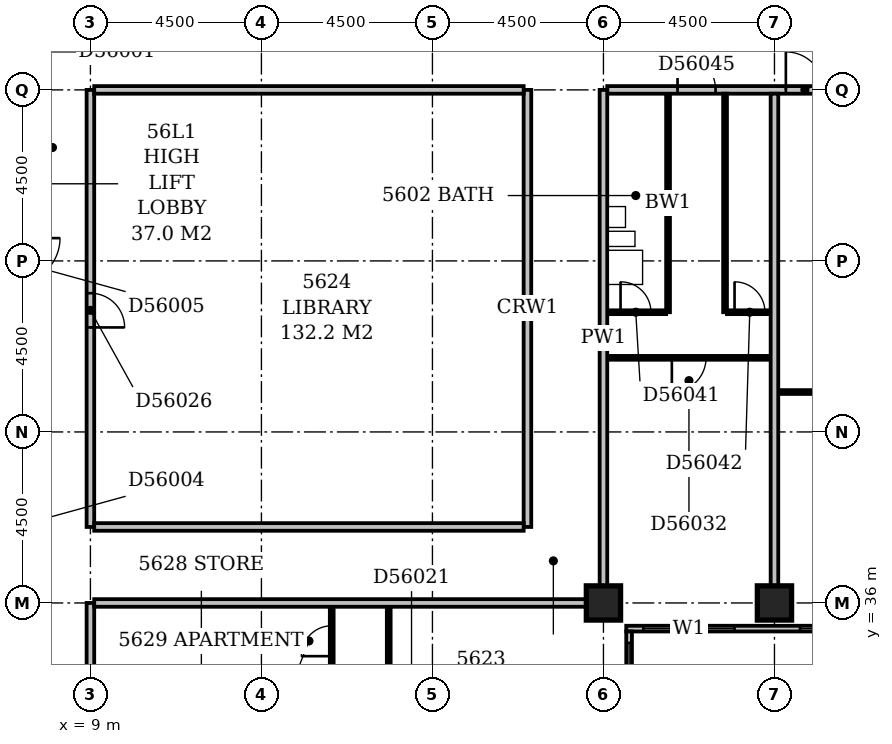
"""IFC4 building model, lengths in metres.
Left out: names, types, materials, properties, quantities, classifications, styles, units other than length and angle.
Written with IfcOpenShell. Run it as: python <this file> out.ifc"""

import sys

from ifc_helpers import new_model, si_unit, direction, frame, frame_2d, origin, origin_2d, place, context, subcontext, project, spatial, rectangle, extrude, element, fill, save


model = new_model("IFC4")
c1 = context("Model", 3, precision=1e-05, world=origin(), true_north=direction((0.0, 1.0)))
c2 = subcontext(c1, "Body", "Model", "MODEL_VIEW")
j1 = project(units=[si_unit("LENGTHUNIT", "METRE"), si_unit("PLANEANGLEUNIT", "RADIAN")], contexts=[c1])
p1 = place(None, origin())
s1 = spatial("IfcSite", under=j1, at=p1, CompositionType="ELEMENT")
p2 = place(p1, origin())
s2 = spatial("IfcBuilding", under=s1, at=p2, CompositionType="ELEMENT")
p3 = place(p2, frame((0.0, 0.0, 218.6)))
s3 = spatial("IfcBuildingStorey", under=s2, at=p3, CompositionType="ELEMENT", Elevation=218.6)
for number, where, z_axis, x_axis in (
    (1, (22.5, 36.0, -0.3), (0.0, 0.0, 1.0), (1.0, 0.0, 0.0)),
    (2, (27.0, 36.0, -0.3), (0.0, 0.0, 1.0), (1.0, 0.0, 0.0)),
):
    element("IfcColumn", number, at=place(p3, frame(where, z_axis=z_axis, x_axis=x_axis)), inside=s3, PredefinedType="COLUMN", context=c2, shape_type="SweptSolid", body=[
        extrude(rectangle(XDim=0.9, YDim=0.9, at=origin_2d()), origin(), (0.0, 0.0, 1.0), 3.6),
    ])
p4 = place(p3, frame((23.175, 17.4, 0.0), z_axis=(0.0, 0.0, 1.0), x_axis=(0.0, 1.0, 0.0)))
e3 = element("IfcWall", 3, at=p4, inside=s3, PredefinedType="STANDARD", context=c2, shape_type="SweptSolid", body=[
    extrude(rectangle(XDim=17.85, YDim=0.15, at=frame_2d((8.925, 0.0))), origin(), (0.0, 0.0, 1.0), 2.7),
])
p5 = place(p4, frame((1.65, 0.0, 0.6)))
e4 = element("IfcOpeningElement", 4, at=p5, cuts=e3, PredefinedType="OPENING", context=c2, shape_type="SweptSolid", body=[
    extrude(rectangle(XDim=2.4, YDim=1.8, at=frame_2d((1.2, 0.9))), frame((0.0, 0.087, 0.0), z_axis=(0.0, -1.0, 0.0), x_axis=(1.0, 0.0, 0.0)), (0.0, 0.0, 1.0), 0.174),
])
p6 = place(p4, frame((6.15, 0.0, 0.6)))
e5 = element("IfcOpeningElement", 5, at=p6, cuts=e3, PredefinedType="OPENING", context=c2, shape_type="SweptSolid", body=[
    extrude(rectangle(XDim=2.4, YDim=1.8, at=frame_2d((1.2, 0.9))), frame((0.0, 0.087, 0.0), z_axis=(0.0, -1.0, 0.0), x_axis=(1.0, 0.0, 0.0)), (0.0, 0.0, 1.0), 0.174),
])
p7 = place(p4, frame((11.337, 0.0, 0.6)))
e6 = element("IfcOpeningElement", 6, at=p7, cuts=e3, PredefinedType="OPENING", context=c2, shape_type="SweptSolid", body=[
    extrude(rectangle(XDim=2.1, YDim=1.8, at=frame_2d((1.05, 0.9))), frame((0.0, 0.087, 0.0), z_axis=(0.0, -1.0, 0.0), x_axis=(1.0, 0.0, 0.0)), (0.0, 0.0, 1.0), 0.174),
])
p8 = place(p4, frame((15.15, 0.0, 0.6)))
e7 = element("IfcOpeningElement", 7, at=p8, cuts=e3, PredefinedType="OPENING", context=c2, shape_type="SweptSolid", body=[
    extrude(rectangle(XDim=2.4, YDim=1.8, at=frame_2d((1.2, 0.9))), frame((0.0, 0.087, 0.0), z_axis=(0.0, -1.0, 0.0), x_axis=(1.0, 0.0, 0.0)), (0.0, 0.0, 1.0), 0.174),
])
p9 = place(p3, frame((23.1, 35.325, 0.0), z_axis=(0.0, 0.0, 1.0), x_axis=(1.0, 0.0, 0.0)))
e8 = element("IfcWall", 8, at=p9, inside=s3, PredefinedType="STANDARD", context=c2, shape_type="SweptSolid", body=[
    extrude(rectangle(XDim=27.15, YDim=0.15, at=frame_2d((13.575, 0.0))), origin(), (0.0, 0.0, 1.0), 2.7),
])
p10 = place(p9, frame((0.45, 0.0, 0.6)))
e9 = element("IfcOpeningElement", 9, at=p10, cuts=e8, PredefinedType="OPENING", context=c2, shape_type="SweptSolid", body=[
    extrude(rectangle(XDim=2.4, YDim=1.8, at=frame_2d((1.2, 0.9))), frame((0.0, 0.087, 0.0), z_axis=(0.0, -1.0, 0.0), x_axis=(1.0, 0.0, 0.0)), (0.0, 0.0, 1.0), 0.174),
])
p11 = place(p9, frame((4.571, 0.0, 0.6)))
e10 = element("IfcOpeningElement", 10, at=p11, cuts=e8, PredefinedType="OPENING", context=c2, shape_type="SweptSolid", body=[
    extrude(rectangle(XDim=2.1, YDim=1.8, at=frame_2d((1.05, 0.9))), frame((0.0, 0.087, 0.0), z_axis=(0.0, -1.0, 0.0), x_axis=(1.0, 0.0, 0.0)), (0.0, 0.0, 1.0), 0.174),
])
p12 = place(p9, frame((9.45, 0.0, 0.6)))
e11 = element("IfcOpeningElement", 11, at=p12, cuts=e8, PredefinedType="OPENING", context=c2, shape_type="SweptSolid", body=[
    extrude(rectangle(XDim=2.4, YDim=1.8, at=frame_2d((1.2, 0.9))), frame((0.0, 0.087, 0.0), z_axis=(0.0, -1.0, 0.0), x_axis=(1.0, 0.0, 0.0)), (0.0, 0.0, 1.0), 0.174),
])
p13 = place(p9, frame((13.95, 0.0, 0.6)))
e12 = element("IfcOpeningElement", 12, at=p13, cuts=e8, PredefinedType="OPENING", context=c2, shape_type="SweptSolid", body=[
    extrude(rectangle(XDim=2.4, YDim=1.8, at=frame_2d((1.2, 0.9))), frame((0.0, 0.087, 0.0), z_axis=(0.0, -1.0, 0.0), x_axis=(1.0, 0.0, 0.0)), (0.0, 0.0, 1.0), 0.174),
])
p14 = place(p9, frame((19.657, 0.0, 0.6)))
e13 = element("IfcOpeningElement", 13, at=p14, cuts=e8, PredefinedType="OPENING", context=c2, shape_type="SweptSolid", body=[
    extrude(rectangle(XDim=1.5, YDim=1.8, at=frame_2d((0.75, 0.9))), frame((0.0, 0.087, 0.0), z_axis=(0.0, -1.0, 0.0), x_axis=(1.0, 0.0, 0.0)), (0.0, 0.0, 1.0), 0.174),
])
p15 = place(p9, frame((22.95, 0.0, 0.6)))
e14 = element("IfcOpeningElement", 14, at=p15, cuts=e8, PredefinedType="OPENING", context=c2, shape_type="SweptSolid", body=[
    extrude(rectangle(XDim=2.4, YDim=1.8, at=frame_2d((1.2, 0.9))), frame((0.0, 0.087, 0.0), z_axis=(0.0, -1.0, 0.0), x_axis=(1.0, 0.0, 0.0)), (0.0, 0.0, 1.0), 0.174),
])
p16 = place(p3, frame((9.0, 18.45, 0.0), z_axis=(0.0, 0.0, 1.0), x_axis=(0.0, 1.0, 0.0)))
e15 = element("IfcWall", 15, at=p16, inside=s3, PredefinedType="PARTITIONING", context=c2, shape_type="SweptSolid", body=[
    extrude(rectangle(XDim=17.55, YDim=0.2, at=frame_2d((8.775, 0.0))), origin(), (0.0, 0.0, 1.0), 3.3),
])
p17 = place(p16, frame((4.35, 0.0, 0.0)))
e16 = element("IfcOpeningElement", 16, at=p17, cuts=e15, PredefinedType="OPENING", context=c2, shape_type="SweptSolid", body=[
    extrude(rectangle(XDim=1.0, YDim=2.1, at=frame_2d((0.5, 1.05))), frame((0.0, 0.112, 0.0), z_axis=(0.0, -1.0, 0.0), x_axis=(1.0, 0.0, 0.0)), (0.0, 0.0, 1.0), 0.224),
])
p18 = place(p16, frame((2.8, 0.0, 0.0)))
e17 = element("IfcOpeningElement", 17, at=p18, cuts=e15, PredefinedType="OPENING", context=c2, shape_type="SweptSolid", body=[
    extrude(rectangle(XDim=1.0, YDim=2.1, at=frame_2d((0.5, 1.05))), frame((0.0, 0.112, 0.0), z_axis=(0.0, -1.0, 0.0), x_axis=(1.0, 0.0, 0.0)), (0.0, 0.0, 1.0), 0.224),
])
p19 = place(p3, frame((16.85, 22.6, 0.0), z_axis=(0.0, 0.0, 1.0), x_axis=(0.0, 1.0, 0.0)))
e18 = element("IfcWall", 18, at=p19, inside=s3, PredefinedType="PARTITIONING", context=c2, shape_type="SweptSolid", body=[
    extrude(rectangle(XDim=13.3, YDim=0.1, at=frame_2d((6.65, 0.0))), origin(), (0.0, 0.0, 1.0), 3.3),
])
p20 = place(p19, frame((1.7, 0.0, 0.0)))
e19 = element("IfcOpeningElement", 19, at=p20, cuts=e18, PredefinedType="OPENING", context=c2, shape_type="SweptSolid", body=[
    extrude(rectangle(XDim=0.9, YDim=2.1, at=frame_2d((0.45, 1.05))), frame((0.0, 0.062, 0.0), z_axis=(0.0, -1.0, 0.0), x_axis=(1.0, 0.0, 0.0)), (0.0, 0.0, 1.0), 0.124),
])
p21 = place(p19, frame((6.2, 0.0, 0.0)))
e20 = element("IfcOpeningElement", 20, at=p21, cuts=e18, PredefinedType="OPENING", context=c2, shape_type="SweptSolid", body=[
    extrude(rectangle(XDim=0.9, YDim=2.1, at=frame_2d((0.45, 1.05))), frame((0.0, 0.062, 0.0), z_axis=(0.0, -1.0, 0.0), x_axis=(1.0, 0.0, 0.0)), (0.0, 0.0, 1.0), 0.124),
])
p22 = place(p19, frame((10.7, 0.0, 0.0)))
e21 = element("IfcOpeningElement", 21, at=p22, cuts=e18, PredefinedType="OPENING", context=c2, shape_type="SweptSolid", body=[
    extrude(rectangle(XDim=0.9, YDim=2.1, at=frame_2d((0.45, 1.05))), frame((0.0, 0.062, 0.0), z_axis=(0.0, -1.0, 0.0), x_axis=(1.0, 0.0, 0.0)), (0.0, 0.0, 1.0), 0.124),
])
p23 = place(p3, frame((15.35, 24.1, 0.0), z_axis=(0.0, 0.0, 1.0), x_axis=(0.0, 1.0, 0.0)))
e22 = element("IfcWall", 22, at=p23, inside=s3, PredefinedType="PARTITIONING", context=c2, shape_type="SweptSolid", body=[
    extrude(rectangle(XDim=11.8, YDim=0.1, at=frame_2d((5.9, 0.0))), origin(), (0.0, 0.0, 1.0), 3.3),
])
p24 = place(p23, frame((6.7, 0.0, 0.0)))
e23 = element("IfcOpeningElement", 23, at=p24, cuts=e22, PredefinedType="OPENING", context=c2, shape_type="SweptSolid", body=[
    extrude(rectangle(XDim=0.8, YDim=2.1, at=frame_2d((0.4, 1.05))), frame((0.0, 0.062, 0.0), z_axis=(0.0, -1.0, 0.0), x_axis=(1.0, 0.0, 0.0)), (0.0, 0.0, 1.0), 0.124),
])
p25 = place(p23, frame((2.5, 0.0, 0.0)))
e24 = element("IfcOpeningElement", 24, at=p25, cuts=e22, PredefinedType="OPENING", context=c2, shape_type="SweptSolid", body=[
    extrude(rectangle(XDim=0.9, YDim=2.1, at=frame_2d((0.45, 1.05))), frame((0.0, 0.062, 0.0), z_axis=(0.0, -1.0, 0.0), x_axis=(1.0, 0.0, 0.0)), (0.0, 0.0, 1.0), 0.124),
])
p26 = place(p23, frame((8.7, 0.0, 0.0)))
e25 = element("IfcOpeningElement", 25, at=p26, cuts=e22, PredefinedType="OPENING", context=c2, shape_type="SweptSolid", body=[
    extrude(rectangle(XDim=0.8, YDim=2.1, at=frame_2d((0.4, 1.05))), frame((0.0, 0.062, 0.0), z_axis=(0.0, -1.0, 0.0), x_axis=(1.0, 0.0, 0.0)), (0.0, 0.0, 1.0), 0.124),
])
p27 = place(p23, frame((10.5, 0.0, 0.0)))
e26 = element("IfcOpeningElement", 26, at=p27, cuts=e22, PredefinedType="OPENING", context=c2, shape_type="SweptSolid", body=[
    extrude(rectangle(XDim=0.8, YDim=2.1, at=frame_2d((0.4, 1.05))), frame((0.0, 0.062, 0.0), z_axis=(0.0, -1.0, 0.0), x_axis=(1.0, 0.0, 0.0)), (0.0, 0.0, 1.0), 0.124),
])
p28 = place(p3, frame((9.1, 36.0, 0.0), z_axis=(0.0, 0.0, 1.0), x_axis=(1.0, 0.0, 0.0)))
e27 = element("IfcWall", 27, at=p28, inside=s3, PredefinedType="PARTITIONING", context=c2, shape_type="SweptSolid", body=[
    extrude(rectangle(XDim=12.95, YDim=0.2, at=frame_2d((6.475, 0.0))), origin(), (0.0, 0.0, 1.0), 3.3),
])
p29 = place(p3, frame((22.5, 36.45, 0.0), z_axis=(0.0, 0.0, 1.0), x_axis=(0.0, 1.0, 0.0)))
e28 = element("IfcWall", 28, at=p29, inside=s3, PredefinedType="PARTITIONING", context=c2, shape_type="SweptSolid", body=[
    extrude(rectangle(XDim=13.05, YDim=0.2, at=frame_2d((6.525, 0.0))), origin(), (0.0, 0.0, 1.0), 3.3),
])
p30 = place(p3, frame((27.0, 36.45, 0.0), z_axis=(0.0, 0.0, 1.0), x_axis=(0.0, 1.0, 0.0)))
e29 = element("IfcWall", 29, at=p30, inside=s3, PredefinedType="PARTITIONING", context=c2, shape_type="SweptSolid", body=[
    extrude(rectangle(XDim=12.95, YDim=0.2, at=frame_2d((6.475, 0.0))), origin(), (0.0, 0.0, 1.0), 2.4),
])
p31 = place(p3, frame((9.0, 38.0, 0.0), z_axis=(0.0, 0.0, 1.0), x_axis=(0.0, 1.0, 0.0)))
e30 = element("IfcWall", 30, at=p31, inside=s3, PredefinedType="PARTITIONING", context=c2, shape_type="SweptSolid", body=[
    extrude(rectangle(XDim=11.5, YDim=0.2, at=frame_2d((5.75, 0.0))), origin(), (0.0, 0.0, 1.0), 3.3),
])
p32 = place(p31, frame((5.25, 0.0, 0.0)))
e31 = element("IfcOpeningElement", 31, at=p32, cuts=e30, PredefinedType="OPENING", context=c2, shape_type="SweptSolid", body=[
    extrude(rectangle(XDim=0.9, YDim=2.1, at=frame_2d((0.45, 1.05))), frame((0.0, 0.112, 0.0), z_axis=(0.0, -1.0, 0.0), x_axis=(1.0, 0.0, 0.0)), (0.0, 0.0, 1.0), 0.224),
])
p33 = place(p3, frame((9.1, 38.0, 0.0), z_axis=(0.0, 0.0, 1.0), x_axis=(1.0, 0.0, 0.0)))
e32 = element("IfcWall", 32, at=p33, inside=s3, PredefinedType="PARTITIONING", context=c2, shape_type="SweptSolid", body=[
    extrude(rectangle(XDim=11.3, YDim=0.2, at=frame_2d((5.65, 0.0))), origin(), (0.0, 0.0, 1.0), 3.3),
])
p34 = place(p3, frame((20.5, 38.0, 0.0), z_axis=(0.0, 0.0, 1.0), x_axis=(0.0, 1.0, 0.0)))
e33 = element("IfcWall", 33, at=p34, inside=s3, PredefinedType="PARTITIONING", context=c2, shape_type="SweptSolid", body=[
    extrude(rectangle(XDim=11.5, YDim=0.2, at=frame_2d((5.75, 0.0))), origin(), (0.0, 0.0, 1.0), 3.3),
])
p35 = place(p3, frame((27.1, 41.55, 0.0), z_axis=(0.0, 0.0, 1.0), x_axis=(1.0, 0.0, 0.0)))
e34 = element("IfcWall", 34, at=p35, inside=s3, PredefinedType="PARTITIONING", context=c2, shape_type="SweptSolid", body=[
    extrude(rectangle(XDim=13.3, YDim=0.1, at=frame_2d((6.65, 0.0))), origin(), (0.0, 0.0, 1.0), 3.3),
])
p36 = place(p35, frame((3.9, 0.0, 0.0)))
e35 = element("IfcOpeningElement", 35, at=p36, cuts=e34, PredefinedType="OPENING", context=c2, shape_type="SweptSolid", body=[
    extrude(rectangle(XDim=0.9, YDim=2.1, at=frame_2d((0.45, 1.05))), frame((0.0, 0.062, 0.0), z_axis=(0.0, -1.0, 0.0), x_axis=(1.0, 0.0, 0.0)), (0.0, 0.0, 1.0), 0.124),
])
p37 = place(p35, frame((10.7, 0.0, 0.0)))
e36 = element("IfcOpeningElement", 36, at=p37, cuts=e34, PredefinedType="OPENING", context=c2, shape_type="SweptSolid", body=[
    extrude(rectangle(XDim=0.9, YDim=2.1, at=frame_2d((0.45, 1.05))), frame((0.0, 0.062, 0.0), z_axis=(0.0, -1.0, 0.0), x_axis=(1.0, 0.0, 0.0)), (0.0, 0.0, 1.0), 0.124),
])
p38 = place(p3, frame((22.6, 42.45, 0.0), z_axis=(0.0, 0.0, 1.0), x_axis=(1.0, 0.0, 0.0)))
e37 = element("IfcWall", 37, at=p38, inside=s3, PredefinedType="PARTITIONING", context=c2, shape_type="SweptSolid", body=[
    extrude(rectangle(XDim=4.3, YDim=0.1, at=frame_2d((2.15, 0.0))), origin(), (0.0, 0.0, 1.0), 3.3),
])
p39 = place(p38, frame((1.7, 0.0, 0.0)))
e38 = element("IfcOpeningElement", 38, at=p39, cuts=e37, PredefinedType="OPENING", context=c2, shape_type="SweptSolid", body=[
    extrude(rectangle(XDim=0.9, YDim=2.1, at=frame_2d((0.45, 1.05))), frame((0.0, 0.062, 0.0), z_axis=(0.0, -1.0, 0.0), x_axis=(1.0, 0.0, 0.0)), (0.0, 0.0, 1.0), 0.124),
])
p40 = place(p3, frame((22.6, 43.65, 0.0), z_axis=(0.0, 0.0, 1.0), x_axis=(1.0, 0.0, 0.0)))
e39 = element("IfcWall", 39, at=p40, inside=s3, PredefinedType="PARTITIONING", context=c2, shape_type="SweptSolid", body=[
    extrude(rectangle(XDim=1.55, YDim=0.1, at=frame_2d((0.775, 0.0))), origin(), (0.0, 0.0, 1.0), 3.3),
])
p41 = place(p40, frame((0.35, 0.0, 0.0)))
e40 = element("IfcOpeningElement", 40, at=p41, cuts=e39, PredefinedType="OPENING", context=c2, shape_type="SweptSolid", body=[
    extrude(rectangle(XDim=0.8, YDim=2.1, at=frame_2d((0.4, 1.05))), frame((0.0, 0.062, 0.0), z_axis=(0.0, -1.0, 0.0), x_axis=(1.0, 0.0, 0.0)), (0.0, 0.0, 1.0), 0.124),
])
p42 = place(p3, frame((24.2, 43.65, 0.0), z_axis=(0.0, 0.0, 1.0), x_axis=(0.0, 1.0, 0.0)))
e41 = element("IfcWall", 41, at=p42, inside=s3, PredefinedType="PLUMBINGWALL", context=c2, shape_type="SweptSolid", body=[
    extrude(rectangle(XDim=5.75, YDim=0.1, at=frame_2d((2.875, 0.0))), origin(), (0.0, 0.0, 1.0), 3.3),
])
p43 = place(p3, frame((25.7, 43.65, 0.0), z_axis=(0.0, 0.0, 1.0), x_axis=(0.0, 1.0, 0.0)))
e42 = element("IfcWall", 42, at=p43, inside=s3, PredefinedType="PARTITIONING", context=c2, shape_type="SweptSolid", body=[
    extrude(rectangle(XDim=5.75, YDim=0.1, at=frame_2d((2.875, 0.0))), origin(), (0.0, 0.0, 1.0), 3.3),
])
p44 = place(p3, frame((25.75, 43.65, 0.0), z_axis=(0.0, 0.0, 1.0), x_axis=(1.0, 0.0, 0.0)))
e43 = element("IfcWall", 43, at=p44, inside=s3, PredefinedType="PARTITIONING", context=c2, shape_type="SweptSolid", body=[
    extrude(rectangle(XDim=1.15, YDim=0.1, at=frame_2d((0.575, 0.0))), origin(), (0.0, 0.0, 1.0), 3.3),
])
p45 = place(p44, frame((0.2, 0.0, 0.0)))
e44 = element("IfcOpeningElement", 44, at=p45, cuts=e43, PredefinedType="OPENING", context=c2, shape_type="SweptSolid", body=[
    extrude(rectangle(XDim=0.8, YDim=2.1, at=frame_2d((0.4, 1.05))), frame((0.0, 0.062, 0.0), z_axis=(0.0, -1.0, 0.0), x_axis=(1.0, 0.0, 0.0)), (0.0, 0.0, 1.0), 0.124),
])
p46 = place(p3, frame((9.1, 49.5, 0.0), z_axis=(0.0, 0.0, 1.0), x_axis=(1.0, 0.0, 0.0)))
e45 = element("IfcWall", 45, at=p46, inside=s3, PredefinedType="PARTITIONING", context=c2, shape_type="SweptSolid", body=[
    extrude(rectangle(XDim=11.3, YDim=0.2, at=frame_2d((5.65, 0.0))), origin(), (0.0, 0.0, 1.0), 3.3),
])
p47 = place(p3, frame((22.6, 49.5, 0.0), z_axis=(0.0, 0.0, 1.0), x_axis=(1.0, 0.0, 0.0)))
e46 = element("IfcWall", 46, at=p47, inside=s3, PredefinedType="PARTITIONING", context=c2, shape_type="SweptSolid", body=[
    extrude(rectangle(XDim=30.95, YDim=0.2, at=frame_2d((15.475, 0.0))), origin(), (0.0, 0.0, 1.0), 3.3),
])
p48 = place(p47, frame((1.85, 0.0, 0.0)))
e47 = element("IfcOpeningElement", 47, at=p48, cuts=e46, PredefinedType="OPENING", context=c2, shape_type="SweptSolid", body=[
    extrude(rectangle(XDim=1.0, YDim=2.1, at=frame_2d((0.5, 1.05))), frame((0.0, 0.112, 0.0), z_axis=(0.0, -1.0, 0.0), x_axis=(1.0, 0.0, 0.0)), (0.0, 0.0, 1.0), 0.224),
])
p49 = place(p47, frame((4.7, 0.0, 0.0)))
e48 = element("IfcOpeningElement", 48, at=p49, cuts=e46, PredefinedType="OPENING", context=c2, shape_type="SweptSolid", body=[
    extrude(rectangle(XDim=1.0, YDim=2.1, at=frame_2d((0.5, 1.05))), frame((0.0, 0.112, 0.0), z_axis=(0.0, -1.0, 0.0), x_axis=(1.0, 0.0, 0.0)), (0.0, 0.0, 1.0), 0.224),
])
p50 = place(p47, frame((18.2, 0.0, 0.0)))
e49 = element("IfcOpeningElement", 49, at=p50, cuts=e46, PredefinedType="OPENING", context=c2, shape_type="SweptSolid", body=[
    extrude(rectangle(XDim=1.0, YDim=2.1, at=frame_2d((0.5, 1.05))), frame((0.0, 0.112, 0.0), z_axis=(0.0, -1.0, 0.0), x_axis=(1.0, 0.0, 0.0)), (0.0, 0.0, 1.0), 0.224),
])
p51 = place(p47, frame((27.15, 0.0, 0.0)))
e50 = element("IfcOpeningElement", 50, at=p51, cuts=e46, PredefinedType="OPENING", context=c2, shape_type="SweptSolid", body=[
    extrude(rectangle(XDim=1.0, YDim=2.1, at=frame_2d((0.5, 1.05))), frame((0.0, 0.112, 0.0), z_axis=(0.0, -1.0, 0.0), x_axis=(1.0, 0.0, 0.0)), (0.0, 0.0, 1.0), 0.224),
])
p52 = place(p8, origin())
e51 = element("IfcWindow", 51, at=p52, inside=s3, PartitioningType="SINGLE_PANEL", PredefinedType="WINDOW", context=c2, shape_type="SweptSolid", body=[
    extrude(rectangle(XDim=2.4, YDim=1.8, at=frame_2d((1.2, 0.9))), frame((0.0, 0.03, 0.0), z_axis=(0.0, -1.0, 0.0), x_axis=(1.0, 0.0, 0.0)), (0.0, 0.0, 1.0), 0.06),
])
fill(e7, e51)
p53 = place(p10, origin())
e52 = element("IfcWindow", 52, at=p53, inside=s3, PartitioningType="SINGLE_PANEL", PredefinedType="WINDOW", context=c2, shape_type="SweptSolid", body=[
    extrude(rectangle(XDim=2.4, YDim=1.8, at=frame_2d((1.2, 0.9))), frame((0.0, 0.03, 0.0), z_axis=(0.0, -1.0, 0.0), x_axis=(1.0, 0.0, 0.0)), (0.0, 0.0, 1.0), 0.06),
])
fill(e9, e52)
p54 = place(p11, origin())
e53 = element("IfcWindow", 53, at=p54, inside=s3, PartitioningType="SINGLE_PANEL", PredefinedType="WINDOW", context=c2, shape_type="SweptSolid", body=[
    extrude(rectangle(XDim=2.1, YDim=1.8, at=frame_2d((1.05, 0.9))), frame((0.0, 0.03, 0.0), z_axis=(0.0, -1.0, 0.0), x_axis=(1.0, 0.0, 0.0)), (0.0, 0.0, 1.0), 0.06),
])
fill(e10, e53)
p55 = place(p27, origin())
e54 = element("IfcDoor", 54, at=p55, inside=s3, OperationType="SINGLE_SWING_LEFT", PredefinedType="DOOR", context=c2, shape_type="SweptSolid", body=[
    extrude(rectangle(XDim=0.8, YDim=2.1, at=frame_2d((0.4, 1.05))), frame((0.0, 0.025, 0.0), z_axis=(0.0, -1.0, 0.0), x_axis=(1.0, 0.0, 0.0)), (0.0, 0.0, 1.0), 0.05),
])
fill(e26, e54)
p56 = place(p32, frame((0.9, 0.0, 0.0), z_axis=(0.0, 0.0, 1.0), x_axis=(-1.0, 0.0, 0.0)))
e55 = element("IfcDoor", 55, at=p56, inside=s3, OperationType="SINGLE_SWING_RIGHT", PredefinedType="DOOR", context=c2, shape_type="SweptSolid", body=[
    extrude(rectangle(XDim=0.9, YDim=2.1, at=frame_2d((0.45, 1.05))), frame((0.0, 0.025, 0.0), z_axis=(0.0, -1.0, 0.0), x_axis=(1.0, 0.0, 0.0)), (0.0, 0.0, 1.0), 0.05),
])
fill(e31, e55)
p57 = place(p39, frame((0.9, 0.0, 0.0), z_axis=(0.0, 0.0, 1.0), x_axis=(-1.0, 0.0, 0.0)))
e56 = element("IfcDoor", 56, at=p57, inside=s3, OperationType="SINGLE_SWING_RIGHT", PredefinedType="DOOR", context=c2, shape_type="SweptSolid", body=[
    extrude(rectangle(XDim=0.9, YDim=2.1, at=frame_2d((0.45, 1.05))), frame((0.0, 0.025, 0.0), z_axis=(0.0, -1.0, 0.0), x_axis=(1.0, 0.0, 0.0)), (0.0, 0.0, 1.0), 0.05),
])
fill(e38, e56)
p58 = place(p41, origin())
e57 = element("IfcDoor", 57, at=p58, inside=s3, OperationType="SINGLE_SWING_LEFT", PredefinedType="DOOR", context=c2, shape_type="SweptSolid", body=[
    extrude(rectangle(XDim=0.8, YDim=2.1, at=frame_2d((0.4, 1.05))), frame((0.0, 0.025, 0.0), z_axis=(0.0, -1.0, 0.0), x_axis=(1.0, 0.0, 0.0)), (0.0, 0.0, 1.0), 0.05),
])
fill(e40, e57)
p59 = place(p45, origin())
e58 = element("IfcDoor", 58, at=p59, inside=s3, OperationType="SINGLE_SWING_LEFT", PredefinedType="DOOR", context=c2, shape_type="SweptSolid", body=[
    extrude(rectangle(XDim=0.8, YDim=2.1, at=frame_2d((0.4, 1.05))), frame((0.0, 0.025, 0.0), z_axis=(0.0, -1.0, 0.0), x_axis=(1.0, 0.0, 0.0)), (0.0, 0.0, 1.0), 0.05),
])
fill(e44, e58)
p60 = place(p48, origin())
e59 = element("IfcDoor", 59, at=p60, inside=s3, OperationType="SINGLE_SWING_LEFT", PredefinedType="DOOR", context=c2, shape_type="SweptSolid", body=[
    extrude(rectangle(XDim=1.0, YDim=2.1, at=frame_2d((0.5, 1.05))), frame((0.0, 0.025, 0.0), z_axis=(0.0, -1.0, 0.0), x_axis=(1.0, 0.0, 0.0)), (0.0, 0.0, 1.0), 0.05),
])
fill(e47, e59)
p61 = place(p49, origin())
e60 = element("IfcDoor", 60, at=p61, inside=s3, OperationType="SINGLE_SWING_LEFT", PredefinedType="DOOR", context=c2, shape_type="SweptSolid", body=[
    extrude(rectangle(XDim=1.0, YDim=2.1, at=frame_2d((0.5, 1.05))), frame((0.0, 0.025, 0.0), z_axis=(0.0, -1.0, 0.0), x_axis=(1.0, 0.0, 0.0)), (0.0, 0.0, 1.0), 0.05),
])
fill(e48, e60)
save(model, sys.argv[1])
